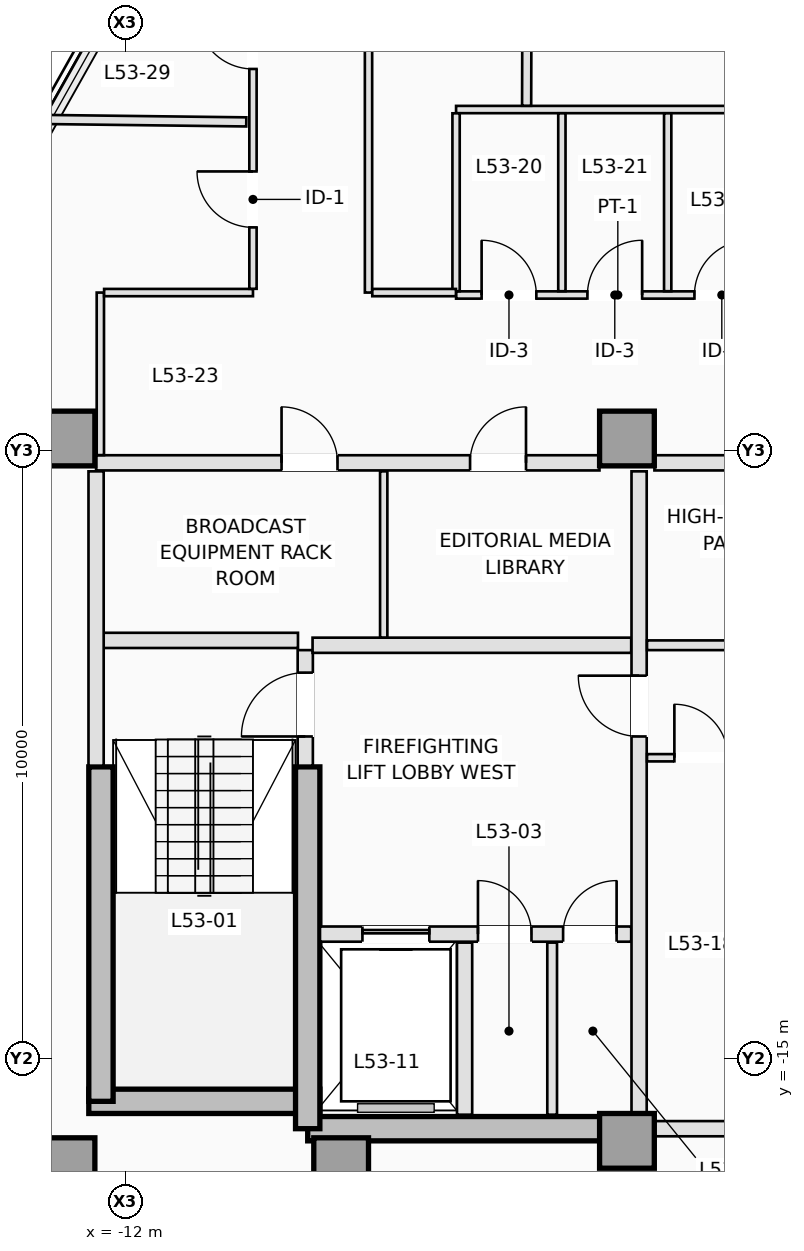
"""IFC4 building model, lengths in metres.
Left out: names, types, materials, properties, quantities, classifications, styles, units other than length and angle.
Written with IfcOpenShell. Run it as: python <this file> out.ifc"""

import sys

from ifc_helpers import new_model, si_unit, direction, frame, frame_2d, origin, origin_2d, place, context, subcontext, project, spatial, rectangle, extrude, element, fill, save


model = new_model("IFC4")
c1 = context("Model", 3, precision=1e-05, world=origin(), true_north=direction((0.0, 1.0)))
c2 = subcontext(c1, "Body", "Model", "MODEL_VIEW")
j1 = project(units=[si_unit("LENGTHUNIT", "METRE"), si_unit("PLANEANGLEUNIT", "RADIAN")], contexts=[c1])
p1 = place(None, origin())
s1 = spatial("IfcSite", under=j1, at=p1, CompositionType="ELEMENT")
p2 = place(p1, origin())
s2 = spatial("IfcBuilding", under=s1, at=p2, CompositionType="ELEMENT")
p3 = place(p2, frame((0.0, 0.0, 193.9)))
s3 = spatial("IfcBuildingStorey", under=s2, at=p3, CompositionType="ELEMENT", Elevation=193.9)
p4 = place(p3, frame((-12.6, -15.7, 0.0), z_axis=(0.0, 0.0, 1.0), x_axis=(1.0, 0.0, 0.0)))
e1 = element("IfcWall", 1, at=p4, inside=s3, PredefinedType="SHEAR", context=c2, shape_type="SweptSolid", body=[
    extrude(rectangle(XDim=3.8, YDim=0.4, at=frame_2d((1.9, 0.0))), origin(), (0.0, 0.0, 1.0), 3.5),
])
p5 = place(p3, frame((-9.0, -16.15, 0.0), z_axis=(0.0, 0.0, 1.0), x_axis=(1.0, 0.0, 0.0)))
e2 = element("IfcWall", 2, at=p5, inside=s3, PredefinedType="SHEAR", context=c2, shape_type="SweptSolid", body=[
    extrude(rectangle(XDim=5.25, YDim=0.4, at=frame_2d((2.625, 0.0))), origin(), (0.0, 0.0, 1.0), 3.5),
])
p6 = place(p3, frame((-12.4, -15.7, 0.0), z_axis=(0.0, 0.0, 1.0), x_axis=(0.0, 1.0, 0.0)))
e3 = element("IfcWall", 3, at=p6, inside=s3, PredefinedType="SHEAR", context=c2, shape_type="SweptSolid", body=[
    extrude(rectangle(XDim=5.5, YDim=0.4, at=frame_2d((2.75, 0.0))), origin(), (0.0, 0.0, 1.0), 3.5),
])
p7 = place(p3, frame((-9.0, -16.15, 0.0), z_axis=(0.0, 0.0, 1.0), x_axis=(0.0, 1.0, 0.0)))
e4 = element("IfcWall", 4, at=p7, inside=s3, PredefinedType="SHEAR", context=c2, shape_type="SweptSolid", body=[
    extrude(rectangle(XDim=5.95, YDim=0.4, at=frame_2d((2.975, 0.0))), origin(), (0.0, 0.0, 1.0), 3.5),
])
for number, where, z_axis, x_axis in (
    (5, (-12.95, -16.75, 0.0), (0.0, 0.0, 1.0), (1.0, 0.0, 0.0)),
    (6, (-8.45, -16.75, 0.0), (0.0, 0.0, 1.0), (1.0, 0.0, 0.0)),
    (7, (-3.75, -16.35, 0.0), (0.0, 0.0, 1.0), (1.0, 0.0, 0.0)),
    (8, (-12.95, -4.8, 0.0), (0.0, 0.0, 1.0), (1.0, 0.0, 0.0)),
    (9, (-3.75, -4.8, 0.0), (0.0, 0.0, 1.0), (1.0, 0.0, 0.0)),
):
    element("IfcColumn", number, at=place(p3, frame(where, z_axis=z_axis, x_axis=x_axis)), inside=s3, PredefinedType="COLUMN", context=c2, shape_type="SweptSolid", body=[
        extrude(rectangle(XDim=0.9, YDim=0.9, at=origin_2d()), origin(), (0.0, 0.0, 1.0), 3.5),
    ])
p8 = place(p3, frame((-9.04, -10.18, 0.0), z_axis=(0.0, 0.0, 1.0), x_axis=(0.0, 1.0, 0.0)))
e10 = element("IfcWall", 10, at=p8, inside=s3, PredefinedType="PARTITIONING", context=c2, shape_type="SweptSolid", body=[
    extrude(rectangle(XDim=1.9, YDim=0.25, at=frame_2d((0.95, 0.0))), origin(), (0.0, 0.0, 1.0), 3.25),
])
p9 = place(p8, frame((0.48, 0.0, 0.0)))
e11 = element("IfcOpeningElement", 11, at=p9, cuts=e10, PredefinedType="OPENING", context=c2, shape_type="SweptSolid", body=[
    extrude(rectangle(XDim=1.05, YDim=2.15, at=frame_2d((0.525, 1.075))), frame((0.0, 0.135, 0.0), z_axis=(0.0, -1.0, 0.0), x_axis=(1.0, 0.0, 0.0)), (0.0, 0.0, 1.0), 0.27),
])
p10 = place(p3, frame((-12.38, -8.12, 0.0), z_axis=(0.0, 0.0, 1.0), x_axis=(1.0, 0.0, 0.0)))
e12 = element("IfcWall", 12, at=p10, inside=s3, PredefinedType="PARTITIONING", context=c2, shape_type="SweptSolid", body=[
    extrude(rectangle(XDim=3.22, YDim=0.25, at=frame_2d((1.61, 0.0))), origin(), (0.0, 0.0, 1.0), 3.25),
])
p11 = place(p3, frame((-12.48, -10.18, 0.0), z_axis=(0.0, 0.0, 1.0), x_axis=(0.0, 1.0, 0.0)))
e13 = element("IfcWall", 13, at=p11, inside=s3, PredefinedType="PARTITIONING", context=c2, shape_type="SweptSolid", body=[
    extrude(rectangle(XDim=4.84, YDim=0.25, at=frame_2d((2.42, 0.0))), origin(), (0.0, 0.0, 1.0), 3.25),
])
p12 = place(p3, frame((-8.798, -12.95, 0.0), z_axis=(0.0, 0.0, 1.0), x_axis=(1.0, 0.0, 0.0)))
e14 = element("IfcWall", 14, at=p12, inside=s3, PredefinedType="PARTITIONING", context=c2, shape_type="SweptSolid", body=[
    extrude(rectangle(XDim=5.118, YDim=0.25, at=frame_2d((2.559, 0.0))), origin(), (0.0, 0.0, 1.0), 3.25),
])
p13 = place(p12, frame((0.698, 0.0, 0.0)))
e15 = element("IfcOpeningElement", 15, at=p13, cuts=e14, PredefinedType="OPENING", context=c2, shape_type="SweptSolid", body=[
    extrude(rectangle(XDim=1.1, YDim=2.15, at=frame_2d((0.55, 1.075))), frame((0.0, 0.135, 0.0), z_axis=(0.0, -1.0, 0.0), x_axis=(1.0, 0.0, 0.0)), (0.0, 0.0, 1.0), 0.27),
])
p14 = place(p12, frame((2.598, 0.0, 0.0)))
e16 = element("IfcOpeningElement", 16, at=p14, cuts=e14, PredefinedType="OPENING", context=c2, shape_type="SweptSolid", body=[
    extrude(rectangle(XDim=0.88, YDim=2.1, at=frame_2d((0.44, 1.05))), frame((0.0, 0.135, 0.0), z_axis=(0.0, -1.0, 0.0), x_axis=(1.0, 0.0, 0.0)), (0.0, 0.0, 1.0), 0.27),
])
p15 = place(p12, frame((3.998, 0.0, 0.0)))
e17 = element("IfcOpeningElement", 17, at=p15, cuts=e14, PredefinedType="OPENING", context=c2, shape_type="SweptSolid", body=[
    extrude(rectangle(XDim=0.88, YDim=2.1, at=frame_2d((0.44, 1.05))), frame((0.0, 0.135, 0.0), z_axis=(0.0, -1.0, 0.0), x_axis=(1.0, 0.0, 0.0)), (0.0, 0.0, 1.0), 0.27),
])
p16 = place(p3, frame((-6.42, -15.92, 0.0), z_axis=(0.0, 0.0, 1.0), x_axis=(0.0, 1.0, 0.0)))
e18 = element("IfcWall", 18, at=p16, inside=s3, PredefinedType="PARTITIONING", context=c2, shape_type="SweptSolid", body=[
    extrude(rectangle(XDim=2.83, YDim=0.25, at=frame_2d((1.415, 0.0))), origin(), (0.0, 0.0, 1.0), 3.25),
])
p17 = place(p3, frame((-4.98, -15.92, 0.0), z_axis=(0.0, 0.0, 1.0), x_axis=(0.0, 1.0, 0.0)))
e19 = element("IfcWall", 19, at=p17, inside=s3, PredefinedType="PARTITIONING", context=c2, shape_type="SweptSolid", body=[
    extrude(rectangle(XDim=2.83, YDim=0.16, at=frame_2d((1.415, 0.0))), origin(), (0.0, 0.0, 1.0), 3.25),
])
p18 = place(p3, frame((-8.92, -8.2, 0.0), z_axis=(0.0, 0.0, 1.0), x_axis=(1.0, 0.0, 0.0)))
e20 = element("IfcWall", 20, at=p18, inside=s3, PredefinedType="PARTITIONING", context=c2, shape_type="SweptSolid", body=[
    extrude(rectangle(XDim=5.24, YDim=0.25, at=frame_2d((2.62, 0.0))), origin(), (0.0, 0.0, 1.0), 3.25),
])
p19 = place(p3, frame((-3.55, -15.898, 0.0), z_axis=(0.0, 0.0, 1.0), x_axis=(0.0, 1.0, 0.0)))
e21 = element("IfcWall", 21, at=p19, inside=s3, PredefinedType="PARTITIONING", context=c2, shape_type="SweptSolid", body=[
    extrude(rectangle(XDim=10.558, YDim=0.25, at=frame_2d((5.279, 0.0))), origin(), (0.0, 0.0, 1.0), 3.25),
])
p20 = place(p19, frame((6.198, 0.0, 0.0)))
e22 = element("IfcOpeningElement", 22, at=p20, cuts=e21, PredefinedType="OPENING", context=c2, shape_type="SweptSolid", body=[
    extrude(rectangle(XDim=1.0, YDim=2.15, at=frame_2d((0.5, 1.075))), frame((0.0, 0.135, 0.0), z_axis=(0.0, -1.0, 0.0), x_axis=(1.0, 0.0, 0.0)), (0.0, 0.0, 1.0), 0.27),
])
p21 = place(p3, frame((-12.48, -5.2, 0.0), z_axis=(0.0, 0.0, 1.0), x_axis=(1.0, 0.0, 0.0)))
e23 = element("IfcWall", 23, at=p21, inside=s3, PredefinedType="PARTITIONING", context=c2, shape_type="SweptSolid", body=[
    extrude(rectangle(XDim=8.278, YDim=0.25, at=frame_2d((4.139, 0.0))), origin(), (0.0, 0.0, 1.0), 3.25),
])
p22 = place(p21, frame((3.05, 0.0, 0.0)))
e24 = element("IfcOpeningElement", 24, at=p22, cuts=e23, PredefinedType="OPENING", context=c2, shape_type="SweptSolid", body=[
    extrude(rectangle(XDim=0.92, YDim=2.12, at=frame_2d((0.46, 1.06))), frame((0.0, 0.135, 0.0), z_axis=(0.0, -1.0, 0.0), x_axis=(1.0, 0.0, 0.0)), (0.0, 0.0, 1.0), 0.27),
])
p23 = place(p21, frame((6.15, 0.0, 0.0)))
e25 = element("IfcOpeningElement", 25, at=p23, cuts=e23, PredefinedType="OPENING", context=c2, shape_type="SweptSolid", body=[
    extrude(rectangle(XDim=0.92, YDim=2.12, at=frame_2d((0.46, 1.06))), frame((0.0, 0.135, 0.0), z_axis=(0.0, -1.0, 0.0), x_axis=(1.0, 0.0, 0.0)), (0.0, 0.0, 1.0), 0.27),
])
p24 = place(p3, frame((-3.298, -5.2, 0.0), z_axis=(0.0, 0.0, 1.0), x_axis=(1.0, 0.0, 0.0)))
e26 = element("IfcWall", 26, at=p24, inside=s3, PredefinedType="PARTITIONING", context=c2, shape_type="SweptSolid", body=[
    extrude(rectangle(XDim=2.348, YDim=0.25, at=frame_2d((1.174, 0.0))), origin(), (0.0, 0.0, 1.0), 3.25),
])
p25 = place(p3, frame((-7.75, -8.073, 0.0), z_axis=(0.0, 0.0, 1.0), x_axis=(0.0, 1.0, 0.0)))
e27 = element("IfcWall", 27, at=p25, inside=s3, PredefinedType="PARTITIONING", context=c2, shape_type="SweptSolid", body=[
    extrude(rectangle(XDim=2.733, YDim=0.12, at=frame_2d((1.366, 0.0))), origin(), (0.0, 0.0, 1.0), 3.25),
])
p26 = place(p3, frame((-3.298, -16.15, 0.0), z_axis=(0.0, 0.0, 1.0), x_axis=(1.0, 0.0, 0.0)))
e28 = element("IfcWall", 28, at=p26, inside=s3, PredefinedType="PARTITIONING", context=c2, shape_type="SweptSolid", body=[
    extrude(rectangle(XDim=6.596, YDim=0.25, at=frame_2d((3.298, 0.0))), origin(), (0.0, 0.0, 1.0), 2.45),
])
p27 = place(p3, frame((-3.42, -8.2, 0.0), z_axis=(0.0, 0.0, 1.0), x_axis=(1.0, 0.0, 0.0)))
e29 = element("IfcWall", 29, at=p27, inside=s3, PredefinedType="PARTITIONING", context=c2, shape_type="SweptSolid", body=[
    extrude(rectangle(XDim=6.84, YDim=0.16, at=frame_2d((3.42, 0.0))), origin(), (0.0, 0.0, 1.0), 3.25),
])
p28 = place(p27, frame((2.92, 0.0, 0.0)))
e30 = element("IfcOpeningElement", 30, at=p28, cuts=e29, PredefinedType="OPENING", context=c2, shape_type="SweptSolid", body=[
    extrude(rectangle(XDim=1.0, YDim=2.15, at=frame_2d((0.5, 1.075))), frame((0.0, 0.09, 0.0), z_axis=(0.0, -1.0, 0.0), x_axis=(1.0, 0.0, 0.0)), (0.0, 0.0, 1.0), 0.18),
])
p29 = place(p3, frame((-3.42, -10.05, 0.0), z_axis=(0.0, 0.0, 1.0), x_axis=(1.0, 0.0, 0.0)))
e31 = element("IfcWall", 31, at=p29, inside=s3, PredefinedType="PARTITIONING", context=c2, shape_type="SweptSolid", body=[
    extrude(rectangle(XDim=6.84, YDim=0.12, at=frame_2d((3.42, 0.0))), origin(), (0.0, 0.0, 1.0), 3.25),
])
p30 = place(p29, frame((0.45, 0.0, 0.0)))
e32 = element("IfcOpeningElement", 32, at=p30, cuts=e31, PredefinedType="OPENING", context=c2, shape_type="SweptSolid", body=[
    extrude(rectangle(XDim=0.88, YDim=2.12, at=frame_2d((0.44, 1.06))), frame((0.0, 0.07, 0.0), z_axis=(0.0, -1.0, 0.0), x_axis=(1.0, 0.0, 0.0)), (0.0, 0.0, 1.0), 0.14),
])
p31 = place(p29, frame((3.6, 0.0, 0.0)))
e33 = element("IfcOpeningElement", 33, at=p31, cuts=e31, PredefinedType="OPENING", context=c2, shape_type="SweptSolid", body=[
    extrude(rectangle(XDim=0.92, YDim=2.12, at=frame_2d((0.46, 1.06))), frame((0.0, 0.07, 0.0), z_axis=(0.0, -1.0, 0.0), x_axis=(1.0, 0.0, 0.0)), (0.0, 0.0, 1.0), 0.14),
])
p32 = place(p3, frame((-6.56, -2.44, 0.0), z_axis=(0.0, 0.0, 1.0), x_axis=(1.0, 0.0, 0.0)))
e34 = element("IfcWall", 34, at=p32, inside=s3, PredefinedType="PARTITIONING", context=c2, shape_type="SweptSolid", body=[
    extrude(rectangle(XDim=5.32, YDim=0.12, at=frame_2d((2.66, 0.0))), origin(), (0.0, 0.0, 1.0), 2.943),
])
p33 = place(p32, frame((0.42, 0.0, 0.0)))
e35 = element("IfcOpeningElement", 35, at=p33, cuts=e34, PredefinedType="OPENING", context=c2, shape_type="SweptSolid", body=[
    extrude(rectangle(XDim=0.9, YDim=2.12, at=frame_2d((0.45, 1.06))), frame((0.0, 0.07, 0.0), z_axis=(0.0, -1.0, 0.0), x_axis=(1.0, 0.0, 0.0)), (0.0, 0.0, 1.0), 0.14),
])
p34 = place(p32, frame((2.16, 0.0, 0.0)))
e36 = element("IfcOpeningElement", 36, at=p34, cuts=e34, PredefinedType="OPENING", context=c2, shape_type="SweptSolid", body=[
    extrude(rectangle(XDim=0.9, YDim=2.12, at=frame_2d((0.45, 1.06))), frame((0.0, 0.07, 0.0), z_axis=(0.0, -1.0, 0.0), x_axis=(1.0, 0.0, 0.0)), (0.0, 0.0, 1.0), 0.14),
])
p35 = place(p32, frame((3.92, 0.0, 0.0)))
e37 = element("IfcOpeningElement", 37, at=p35, cuts=e34, PredefinedType="OPENING", context=c2, shape_type="SweptSolid", body=[
    extrude(rectangle(XDim=0.9, YDim=2.12, at=frame_2d((0.45, 1.06))), frame((0.0, 0.07, 0.0), z_axis=(0.0, -1.0, 0.0), x_axis=(1.0, 0.0, 0.0)), (0.0, 0.0, 1.0), 0.14),
])
p36 = place(p3, frame((-6.56, 0.61, 0.0), z_axis=(0.0, 0.0, 1.0), x_axis=(1.0, 0.0, 0.0)))
e38 = element("IfcWall", 38, at=p36, inside=s3, PredefinedType="PARTITIONING", context=c2, shape_type="SweptSolid", body=[
    extrude(rectangle(XDim=5.32, YDim=0.12, at=frame_2d((2.66, 0.0))), origin(), (0.0, 0.0, 1.0), 3.25),
])
for number, where, z_axis, x_axis in (
    (39, (-6.56, -2.378, 0.0), (0.0, 0.0, 1.0), (0.0, 1.0, 0.0)),
    (40, (-4.82, -2.378, 0.0), (0.0, 0.0, 1.0), (0.0, 1.0, 0.0)),
    (41, (-3.08, -2.378, 0.0), (0.0, 0.0, 1.0), (0.0, 1.0, 0.0)),
):
    element("IfcWall", number, at=place(p3, frame(where, z_axis=z_axis, x_axis=x_axis)), inside=s3, PredefinedType="PARTITIONING", context=c2, shape_type="SweptSolid", body=[
        extrude(rectangle(XDim=2.926, YDim=0.12, at=frame_2d((1.463, 0.0))), origin(), (0.0, 0.0, 1.0), 3.25),
    ])
p37 = place(p3, frame((-12.41, -5.073, 0.0), z_axis=(0.0, 0.0, 1.0), x_axis=(0.0, 1.0, 0.0)))
e42 = element("IfcWall", 42, at=p37, inside=s3, PredefinedType="PARTITIONING", context=c2, shape_type="SweptSolid", body=[
    extrude(rectangle(XDim=2.673, YDim=0.12, at=frame_2d((1.336, 0.0))), origin(), (0.0, 0.0, 1.0), 3.25),
])
p38 = place(p3, frame((-12.348, -2.4, 0.0), z_axis=(0.0, 0.0, 1.0), x_axis=(1.0, 0.0, 0.0)))
e43 = element("IfcWall", 43, at=p38, inside=s3, PredefinedType="PARTITIONING", context=c2, shape_type="SweptSolid", body=[
    extrude(rectangle(XDim=2.448, YDim=0.12, at=frame_2d((1.224, 0.0))), origin(), (0.0, 0.0, 1.0), 3.25),
])
p39 = place(p3, frame((-9.9, -2.338, 0.0), z_axis=(0.0, 0.0, 1.0), x_axis=(0.0, 1.0, 0.0)))
e44 = element("IfcWall", 44, at=p39, inside=s3, PredefinedType="PARTITIONING", context=c2, shape_type="SweptSolid", body=[
    extrude(rectangle(XDim=6.303, YDim=0.12, at=frame_2d((3.151, 0.0))), origin(), (0.0, 0.0, 1.0), 3.25),
])
p40 = place(p39, frame((3.615, 0.0, 0.0)))
e45 = element("IfcOpeningElement", 45, at=p40, cuts=e44, PredefinedType="OPENING", context=c2, shape_type="SweptSolid", body=[
    extrude(rectangle(XDim=0.92, YDim=2.12, at=frame_2d((0.46, 1.06))), frame((0.0, 0.07, 0.0), z_axis=(0.0, -1.0, 0.0), x_axis=(1.0, 0.0, 0.0)), (0.0, 0.0, 1.0), 0.14),
])
p41 = place(p39, frame((1.01, 0.0, 0.0)))
e46 = element("IfcOpeningElement", 46, at=p41, cuts=e44, PredefinedType="OPENING", context=c2, shape_type="SweptSolid", body=[
    extrude(rectangle(XDim=0.92, YDim=2.12, at=frame_2d((0.46, 1.06))), frame((0.0, 0.07, 0.0), z_axis=(0.0, -1.0, 0.0), x_axis=(1.0, 0.0, 0.0)), (0.0, 0.0, 1.0), 0.14),
])
p42 = place(p3, frame((-8.0, 7.216, 0.0), z_axis=(0.0, 0.0, 1.0), x_axis=(0.0, -1.0, 0.0)))
e47 = element("IfcWall", 47, at=p42, inside=s3, PredefinedType="PARTITIONING", context=c2, shape_type="SweptSolid", body=[
    extrude(rectangle(XDim=9.616, YDim=0.12, at=frame_2d((4.808, 0.0))), origin(), (0.0, 0.0, 1.0), 3.25),
])
p43 = place(p42, frame((4.284, 0.0, 0.0)))
e48 = element("IfcOpeningElement", 48, at=p43, cuts=e47, PredefinedType="OPENING", context=c2, shape_type="SweptSolid", body=[
    extrude(rectangle(XDim=0.92, YDim=2.12, at=frame_2d((0.46, 1.06))), frame((0.0, 0.07, 0.0), z_axis=(0.0, -1.0, 0.0), x_axis=(1.0, 0.0, 0.0)), (0.0, 0.0, 1.0), 0.14),
])
p44 = place(p3, frame((-7.938, -2.4, 0.0), z_axis=(0.0, 0.0, 1.0), x_axis=(1.0, 0.0, 0.0)))
e49 = element("IfcWall", 49, at=p44, inside=s3, PredefinedType="PARTITIONING", context=c2, shape_type="SweptSolid", body=[
    extrude(rectangle(XDim=1.376, YDim=0.12, at=frame_2d((0.688, 0.0))), origin(), (0.0, 0.0, 1.0), 3.25),
])
p45 = place(p3, frame((-5.4, 0.672, 0.0), z_axis=(0.0, 0.0, 1.0), x_axis=(0.002918134461, 0.999995742237, 0.0)))
e50 = element("IfcWall", 50, at=p45, inside=s3, PredefinedType="PARTITIONING", context=c2, shape_type="SweptSolid", body=[
    extrude(rectangle(XDim=13.47, YDim=0.15, at=frame_2d((6.735, 0.0))), origin(), (0.0, 0.0, 1.0), 3.25),
])
p46 = place(p3, frame((-10.01, 0.406, 0.0), z_axis=(0.0, 0.0, 1.0), x_axis=(-0.999926820202, 0.012097695659, 0.0)))
e51 = element("IfcWall", 51, at=p46, inside=s3, PredefinedType="PARTITIONING", context=c2, shape_type="SweptSolid", body=[
    extrude(rectangle(XDim=3.269, YDim=0.15, at=frame_2d((1.635, 0.0))), origin(), (0.0, 0.0, 1.0), 3.25),
])
p47 = place(p13, origin())
e52 = element("IfcDoor", 52, at=p47, inside=s3, OperationType="SLIDING_TO_LEFT", PredefinedType="DOOR", context=c2, shape_type="SweptSolid", body=[
    extrude(rectangle(XDim=1.1, YDim=2.15, at=frame_2d((0.55, 1.075))), frame((0.0, 0.025, 0.0), z_axis=(0.0, -1.0, 0.0), x_axis=(1.0, 0.0, 0.0)), (0.0, 0.0, 1.0), 0.05),
])
fill(e15, e52)
p48 = place(p9, origin())
e53 = element("IfcDoor", 53, at=p48, inside=s3, OperationType="SINGLE_SWING_LEFT", PredefinedType="DOOR", context=c2, shape_type="SweptSolid", body=[
    extrude(rectangle(XDim=1.05, YDim=2.15, at=frame_2d((0.525, 1.075))), frame((0.0, 0.025, 0.0), z_axis=(0.0, -1.0, 0.0), x_axis=(1.0, 0.0, 0.0)), (0.0, 0.0, 1.0), 0.05),
])
fill(e11, e53)
p49 = place(p14, origin())
e54 = element("IfcDoor", 54, at=p49, inside=s3, OperationType="SINGLE_SWING_LEFT", PredefinedType="TRAPDOOR", context=c2, shape_type="SweptSolid", body=[
    extrude(rectangle(XDim=0.88, YDim=2.1, at=frame_2d((0.44, 1.05))), frame((0.0, 0.025, 0.0), z_axis=(0.0, -1.0, 0.0), x_axis=(1.0, 0.0, 0.0)), (0.0, 0.0, 1.0), 0.05),
])
fill(e16, e54)
p50 = place(p15, origin())
e55 = element("IfcDoor", 55, at=p50, inside=s3, OperationType="SINGLE_SWING_RIGHT", PredefinedType="TRAPDOOR", context=c2, shape_type="SweptSolid", body=[
    extrude(rectangle(XDim=0.88, YDim=2.1, at=frame_2d((0.44, 1.05))), frame((0.0, 0.025, 0.0), z_axis=(0.0, -1.0, 0.0), x_axis=(1.0, 0.0, 0.0)), (0.0, 0.0, 1.0), 0.05),
])
fill(e17, e55)
p51 = place(p20, origin())
e56 = element("IfcDoor", 56, at=p51, inside=s3, OperationType="SINGLE_SWING_RIGHT", PredefinedType="DOOR", context=c2, shape_type="SweptSolid", body=[
    extrude(rectangle(XDim=1.0, YDim=2.15, at=frame_2d((0.5, 1.075))), frame((0.0, 0.025, 0.0), z_axis=(0.0, -1.0, 0.0), x_axis=(1.0, 0.0, 0.0)), (0.0, 0.0, 1.0), 0.05),
])
fill(e22, e56)
p52 = place(p22, origin())
e57 = element("IfcDoor", 57, at=p52, inside=s3, OperationType="SINGLE_SWING_LEFT", PredefinedType="DOOR", context=c2, shape_type="SweptSolid", body=[
    extrude(rectangle(XDim=0.92, YDim=2.12, at=frame_2d((0.46, 1.06))), frame((0.0, 0.025, 0.0), z_axis=(0.0, -1.0, 0.0), x_axis=(1.0, 0.0, 0.0)), (0.0, 0.0, 1.0), 0.05),
])
fill(e24, e57)
p53 = place(p23, origin())
e58 = element("IfcDoor", 58, at=p53, inside=s3, OperationType="SINGLE_SWING_RIGHT", PredefinedType="DOOR", context=c2, shape_type="SweptSolid", body=[
    extrude(rectangle(XDim=0.92, YDim=2.12, at=frame_2d((0.46, 1.06))), frame((0.0, 0.025, 0.0), z_axis=(0.0, -1.0, 0.0), x_axis=(1.0, 0.0, 0.0)), (0.0, 0.0, 1.0), 0.05),
])
fill(e25, e58)
p54 = place(p30, origin())
e59 = element("IfcDoor", 59, at=p54, inside=s3, OperationType="SINGLE_SWING_LEFT", PredefinedType="DOOR", context=c2, shape_type="SweptSolid", body=[
    extrude(rectangle(XDim=0.88, YDim=2.12, at=frame_2d((0.44, 1.06))), frame((0.0, 0.025, 0.0), z_axis=(0.0, -1.0, 0.0), x_axis=(1.0, 0.0, 0.0)), (0.0, 0.0, 1.0), 0.05),
])
fill(e32, e59)
p55 = place(p33, origin())
e60 = element("IfcDoor", 60, at=p55, inside=s3, OperationType="SINGLE_SWING_LEFT", PredefinedType="DOOR", context=c2, shape_type="SweptSolid", body=[
    extrude(rectangle(XDim=0.9, YDim=2.12, at=frame_2d((0.45, 1.06))), frame((0.0, 0.025, 0.0), z_axis=(0.0, -1.0, 0.0), x_axis=(1.0, 0.0, 0.0)), (0.0, 0.0, 1.0), 0.05),
])
fill(e35, e60)
p56 = place(p34, origin())
e61 = element("IfcDoor", 61, at=p56, inside=s3, OperationType="SINGLE_SWING_RIGHT", PredefinedType="DOOR", context=c2, shape_type="SweptSolid", body=[
    extrude(rectangle(XDim=0.9, YDim=2.12, at=frame_2d((0.45, 1.06))), frame((0.0, 0.025, 0.0), z_axis=(0.0, -1.0, 0.0), x_axis=(1.0, 0.0, 0.0)), (0.0, 0.0, 1.0), 0.05),
])
fill(e36, e61)
p57 = place(p35, origin())
e62 = element("IfcDoor", 62, at=p57, inside=s3, OperationType="SINGLE_SWING_RIGHT", PredefinedType="DOOR", context=c2, shape_type="SweptSolid", body=[
    extrude(rectangle(XDim=0.9, YDim=2.12, at=frame_2d((0.45, 1.06))), frame((0.0, 0.025, 0.0), z_axis=(0.0, -1.0, 0.0), x_axis=(1.0, 0.0, 0.0)), (0.0, 0.0, 1.0), 0.05),
])
fill(e37, e62)
p58 = place(p40, origin())
e63 = element("IfcDoor", 63, at=p58, inside=s3, OperationType="SINGLE_SWING_RIGHT", PredefinedType="DOOR", context=c2, shape_type="SweptSolid", body=[
    extrude(rectangle(XDim=0.92, YDim=2.12, at=frame_2d((0.46, 1.06))), frame((0.0, 0.025, 0.0), z_axis=(0.0, -1.0, 0.0), x_axis=(1.0, 0.0, 0.0)), (0.0, 0.0, 1.0), 0.05),
])
fill(e45, e63)
p59 = place(p41, origin())
e64 = element("IfcDoor", 64, at=p59, inside=s3, OperationType="SINGLE_SWING_RIGHT", PredefinedType="DOOR", context=c2, shape_type="SweptSolid", body=[
    extrude(rectangle(XDim=0.92, YDim=2.12, at=frame_2d((0.46, 1.06))), frame((0.0, 0.025, 0.0), z_axis=(0.0, -1.0, 0.0), x_axis=(1.0, 0.0, 0.0)), (0.0, 0.0, 1.0), 0.05),
])
fill(e46, e64)
save(model, sys.argv[1])
